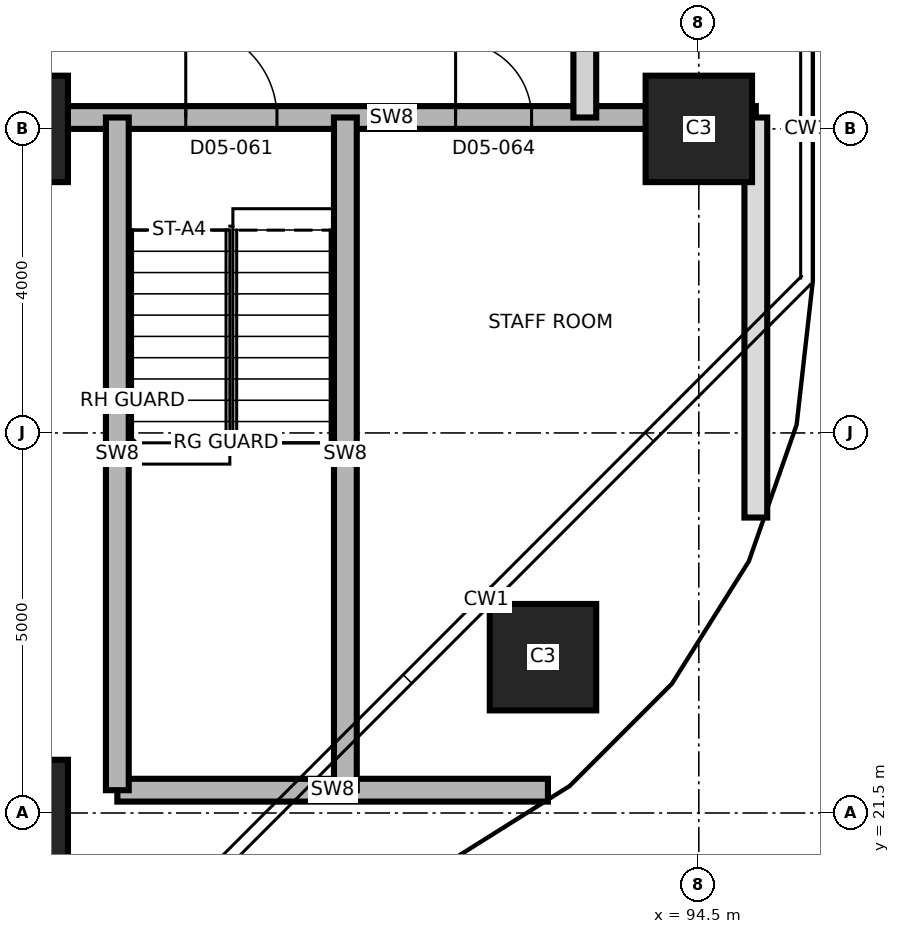
"""IFC4 building model, lengths in metres.
Left out: names, types, materials, properties, quantities, classifications, styles, units other than length and angle.
Written with IfcOpenShell. Run it as: python <this file> out.ifc"""

import sys

from ifc_helpers import new_model, si_unit, direction, frame, frame_2d, origin, origin_2d, place, context, subcontext, project, spatial, rectangle, extrude, element, fill, save


model = new_model("IFC4")
c1 = context("Model", 3, precision=1e-05, world=origin(), true_north=direction((0.0, 1.0)))
c2 = subcontext(c1, "Body", "Model", "MODEL_VIEW")
j1 = project(units=[si_unit("LENGTHUNIT", "METRE"), si_unit("PLANEANGLEUNIT", "RADIAN")], contexts=[c1])
p1 = place(None, origin())
s1 = spatial("IfcSite", under=j1, at=p1, CompositionType="ELEMENT")
p2 = place(p1, origin())
s2 = spatial("IfcBuilding", under=s1, at=p2, CompositionType="ELEMENT")
p3 = place(p2, frame((0.0, 0.0, 70.5)))
s3 = spatial("IfcBuildingStorey", under=s2, at=p3, CompositionType="ELEMENT", Elevation=70.5)
for number, where, z_axis, x_axis in (
    (1, (85.5, 21.5, 0.0), (0.0, 0.0, 1.0), (1.0, 0.0, 0.0)),
    (2, (92.45, 23.55, 0.0), (0.0, 0.0, 1.0), (1.0, 0.0, 0.0)),
    (3, (85.5, 30.5, 0.0), (0.0, 0.0, 1.0), (1.0, 0.0, 0.0)),
    (4, (94.5, 30.5, 0.0), (0.0, 0.0, 1.0), (1.0, 0.0, 0.0)),
):
    element("IfcColumn", number, at=place(p3, frame(where, z_axis=z_axis, x_axis=x_axis)), inside=s3, PredefinedType="COLUMN", context=c2, shape_type="SweptSolid", body=[
        extrude(rectangle(XDim=1.4, YDim=1.4, at=origin_2d()), origin(), (0.0, 0.0, 1.0), 3.7),
    ])
p4 = place(p3, frame((86.85, 21.8, 0.0), z_axis=(0.0, 0.0, 1.0), x_axis=(1.0, 0.0, 0.0)))
e5 = element("IfcWall", 5, at=p4, inside=s3, PredefinedType="SHEAR", context=c2, shape_type="SweptSolid", body=[
    extrude(rectangle(XDim=5.665, YDim=0.3, at=frame_2d((2.833, 0.0))), origin(), (0.0, 0.0, 1.0), 3.4),
])
p5 = place(p3, frame((85.67, 30.65, 0.0), z_axis=(0.0, 0.0, 1.0), x_axis=(1.0, 0.0, 0.0)))
e6 = element("IfcWall", 6, at=p5, inside=s3, PredefinedType="SHEAR", context=c2, shape_type="SweptSolid", body=[
    extrude(rectangle(XDim=9.58, YDim=0.3, at=frame_2d((4.79, 0.0))), origin(), (0.0, 0.0, 1.0), 3.4),
])
p6 = place(p5, frame((2.08, 0.0, 0.0)))
e7 = element("IfcOpeningElement", 7, at=p6, cuts=e6, PredefinedType="OPENING", context=c2, shape_type="SweptSolid", body=[
    extrude(rectangle(XDim=1.2, YDim=2.1, at=frame_2d((0.6, 1.05))), frame((0.0, 0.16, 0.0), z_axis=(0.0, -1.0, 0.0), x_axis=(1.0, 0.0, 0.0)), (0.0, 0.0, 1.0), 0.32),
])
p7 = place(p5, frame((5.63, 0.0, 0.0)))
e8 = element("IfcOpeningElement", 8, at=p7, cuts=e6, PredefinedType="OPENING", context=c2, shape_type="SweptSolid", body=[
    extrude(rectangle(XDim=1.0, YDim=2.1, at=frame_2d((0.5, 1.05))), frame((0.0, 0.16, 0.0), z_axis=(0.0, -1.0, 0.0), x_axis=(1.0, 0.0, 0.0)), (0.0, 0.0, 1.0), 0.32),
])
for number, where, z_axis, x_axis in (
    (9, (86.85, 21.8, 0.0), (0.0, 0.0, 1.0), (0.0, 1.0, 0.0)),
    (10, (89.85, 21.8, 0.0), (0.0, 0.0, 1.0), (0.0, 1.0, 0.0)),
):
    element("IfcWall", number, at=place(p3, frame(where, z_axis=z_axis, x_axis=x_axis)), inside=s3, PredefinedType="SHEAR", context=c2, shape_type="SweptSolid", body=[
        extrude(rectangle(XDim=8.85, YDim=0.3, at=frame_2d((4.425, 0.0))), origin(), (0.0, 0.0, 1.0), 3.4),
    ])
p8 = place(p3, frame((93.0, 30.65, 0.0), z_axis=(0.0, 0.0, 1.0), x_axis=(0.0, 1.0, 0.0)))
e11 = element("IfcWall", 11, at=p8, inside=s3, PredefinedType="PARTITIONING", context=c2, shape_type="SweptSolid", body=[
    extrude(rectangle(XDim=2.7, YDim=0.3, at=frame_2d((1.35, 0.0))), origin(), (0.0, 0.0, 1.0), 3.4),
])
p9 = place(p3, frame((95.25, 25.387, 0.0), z_axis=(0.0, 0.0, 1.0), x_axis=(0.0, 1.0, 0.0)))
e12 = element("IfcWall", 12, at=p9, inside=s3, PredefinedType="PARTITIONING", context=c2, shape_type="SweptSolid", body=[
    extrude(rectangle(XDim=5.263, YDim=0.3, at=frame_2d((2.631, 0.0))), origin(), (0.0, 0.0, 1.0), 3.4),
])
p10 = place(p6, origin())
e13 = element("IfcDoor", 13, at=p10, inside=s3, OperationType="SINGLE_SWING_LEFT", PredefinedType="DOOR", context=c2, shape_type="SweptSolid", body=[
    extrude(rectangle(XDim=1.2, YDim=2.1, at=frame_2d((0.6, 1.05))), frame((0.0, 0.025, 0.0), z_axis=(0.0, -1.0, 0.0), x_axis=(1.0, 0.0, 0.0)), (0.0, 0.0, 1.0), 0.05),
])
fill(e7, e13)
p11 = place(p7, origin())
e14 = element("IfcDoor", 14, at=p11, inside=s3, OperationType="SINGLE_SWING_LEFT", PredefinedType="DOOR", context=c2, shape_type="SweptSolid", body=[
    extrude(rectangle(XDim=1.0, YDim=2.1, at=frame_2d((0.5, 1.05))), frame((0.0, 0.025, 0.0), z_axis=(0.0, -1.0, 0.0), x_axis=(1.0, 0.0, 0.0)), (0.0, 0.0, 1.0), 0.05),
])
fill(e8, e14)
save(model, sys.argv[1])
